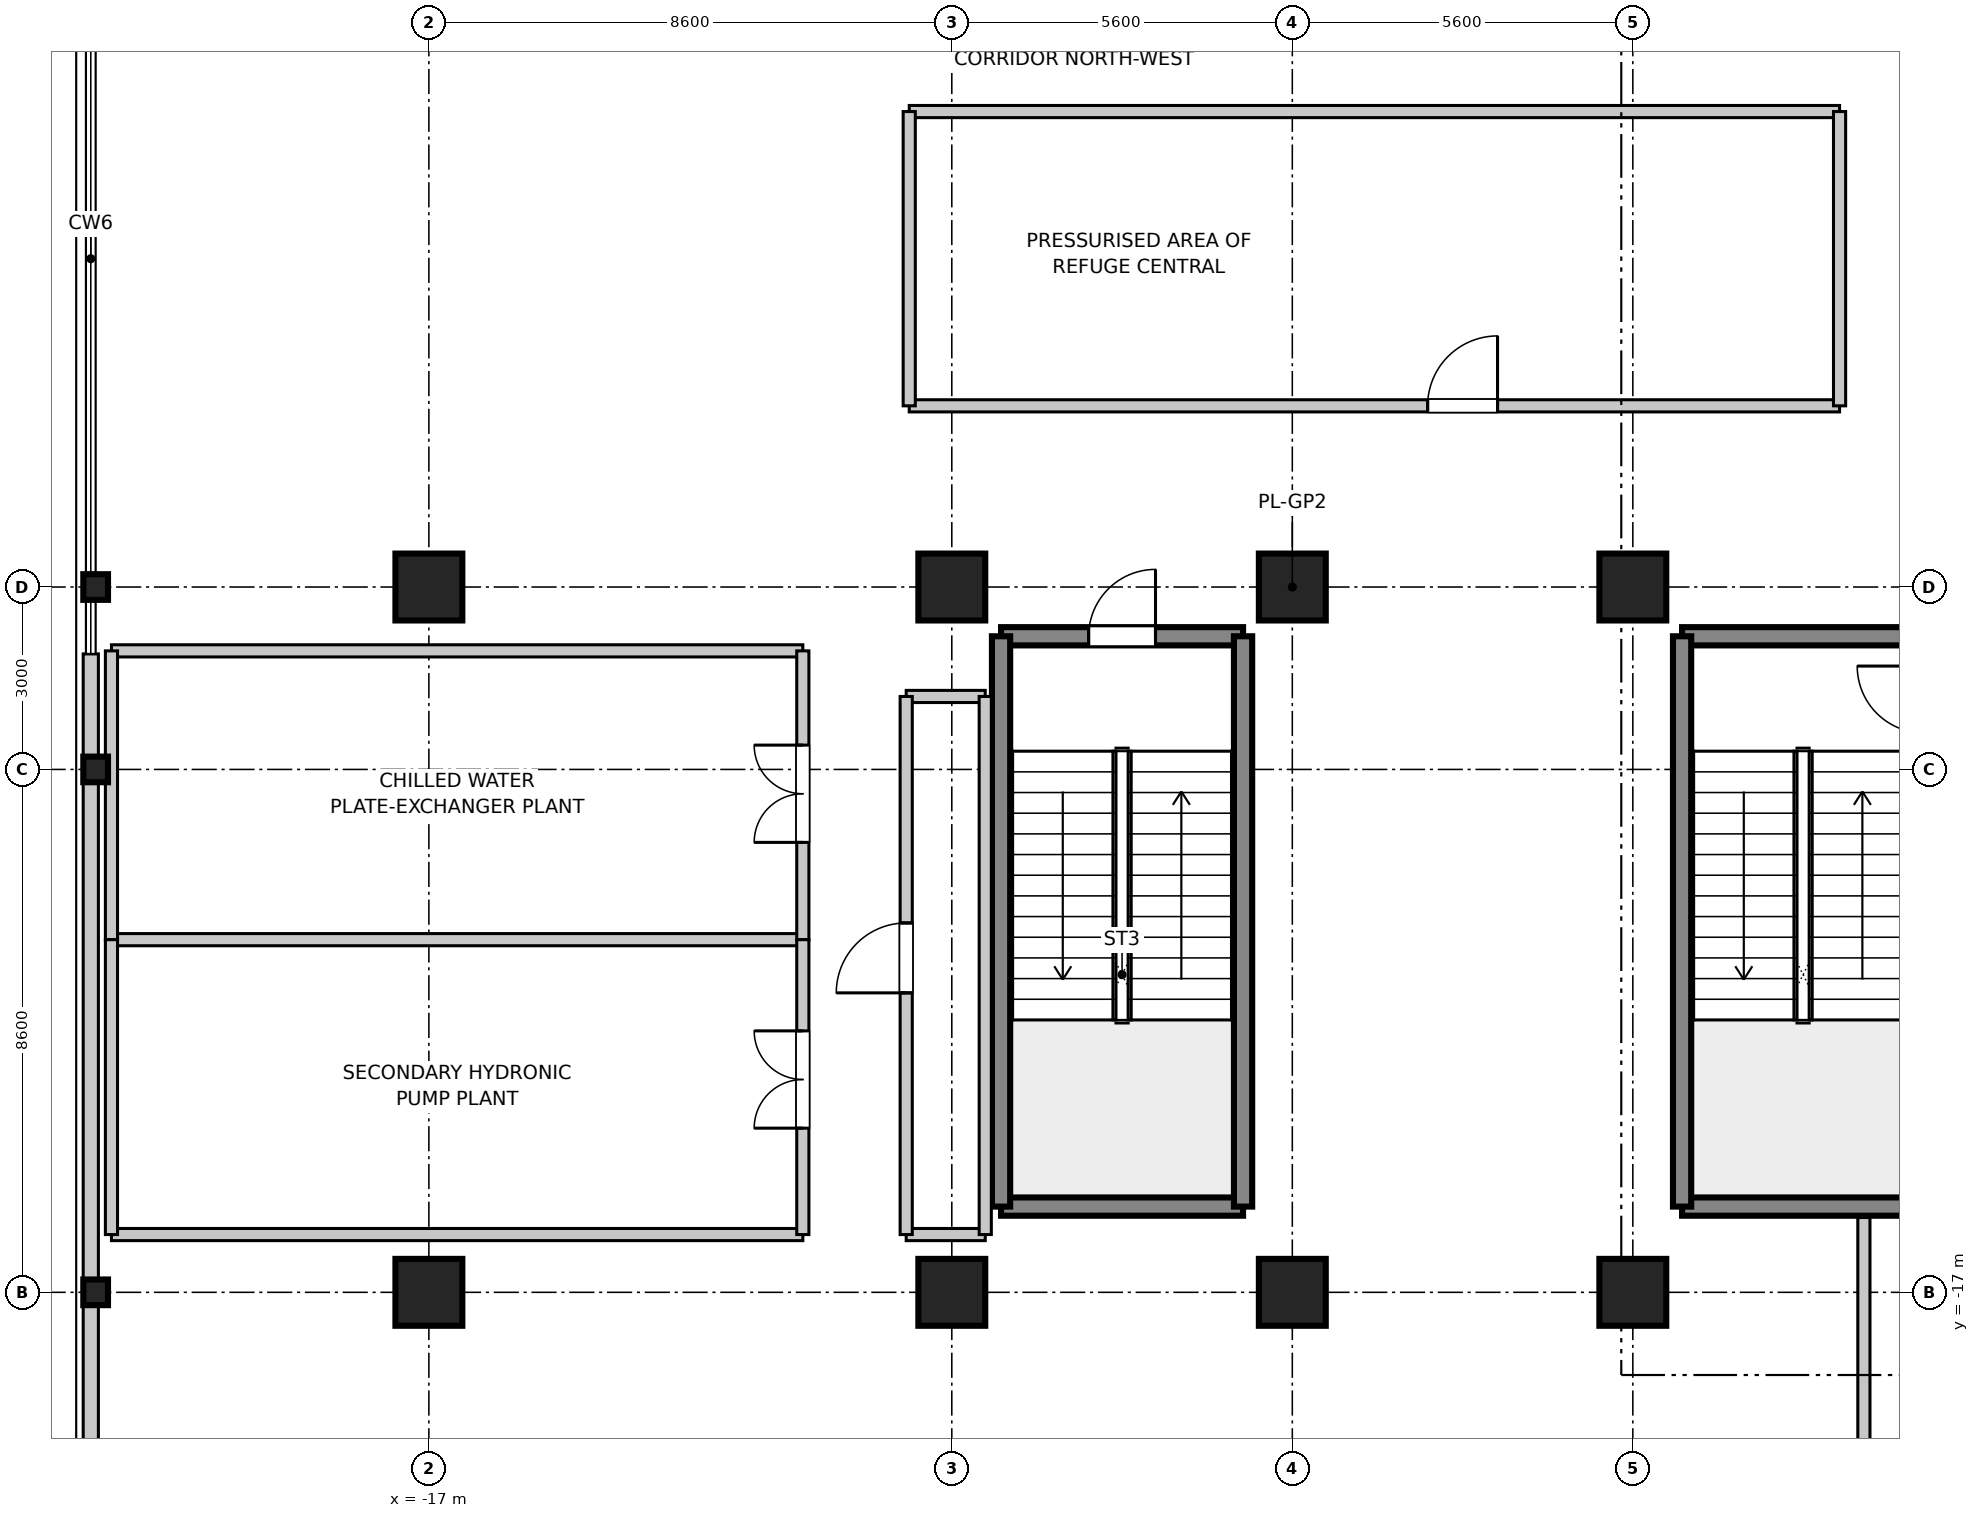
"""IFC4 building model, lengths in metres.
Left out: names, types, materials, properties, quantities, classifications, styles, units other than length and angle.
Written with IfcOpenShell. Run it as: python <this file> out.ifc"""

import sys

from ifc_helpers import new_model, si_unit, direction, frame, frame_2d, origin, origin_2d, place, context, subcontext, project, spatial, rectangle, i_section, extrude, source, transform, mapped, element, fill, save


model = new_model("IFC4")
c1 = context("Model", 3, precision=1e-05, world=origin(), true_north=direction((0.0, 1.0)))
c2 = subcontext(c1, "Body", "Model", "MODEL_VIEW")
j1 = project(units=[si_unit("LENGTHUNIT", "METRE"), si_unit("PLANEANGLEUNIT", "RADIAN")], contexts=[c1])
p1 = place(None, origin())
s1 = spatial("IfcSite", under=j1, at=p1, CompositionType="ELEMENT")
p2 = place(p1, origin())
s2 = spatial("IfcBuilding", under=s1, at=p2, CompositionType="ELEMENT")
p3 = place(p2, frame((0.0, 0.0, 200.1)))
s3 = spatial("IfcBuildingStorey", under=s2, at=p3, CompositionType="ELEMENT", Elevation=200.1)
m1 = source(origin(), c2, "Body", "SweptSolid", [
    extrude(rectangle(XDim=1.1, YDim=1.1, at=origin_2d()), origin(), (0.0, 0.0, 1.0), 4.755),
])
for number, where, z_axis, x_axis in (
    (1, (-17.0, -17.0, 0.0), (0.0, 0.0, 1.0), (1.0, 0.0, 0.0)),
    (2, (-17.0, -5.4, 0.0), (0.0, 0.0, 1.0), (1.0, 0.0, 0.0)),
    (3, (-8.4, -17.0, 0.0), (0.0, 0.0, 1.0), (1.0, 0.0, 0.0)),
    (4, (-8.4, -5.4, 0.0), (0.0, 0.0, 1.0), (1.0, 0.0, 0.0)),
    (5, (-2.8, -17.0, 0.0), (0.0, 0.0, 1.0), (1.0, 0.0, 0.0)),
    (6, (-2.8, -5.4, 0.0), (0.0, 0.0, 1.0), (1.0, 0.0, 0.0)),
    (7, (2.8, -17.0, 0.0), (0.0, 0.0, 1.0), (1.0, 0.0, 0.0)),
    (8, (2.8, -5.4, 0.0), (0.0, 0.0, 1.0), (1.0, 0.0, 0.0)),
):
    element("IfcColumn", number, at=place(p3, frame(where, z_axis=z_axis, x_axis=x_axis)), inside=s3, PredefinedType="COLUMN", context=c2, shape_type="MappedRepresentation", body=[
        mapped(m1, transform((0.0, 0.0, 0.0), scale=1.0)),
    ])
m2 = source(origin(), c2, "Body", "SweptSolid", [
    extrude(i_section(OverallWidth=0.406, OverallDepth=0.422, WebThickness=0.019, FlangeThickness=0.03, at=origin_2d()), origin(), (0.0, 0.0, 1.0), 4.861),
])
for number, where, z_axis, x_axis in (
    (9, (-22.48, -17.0, 0.0), (-0.288, 0.0, 0.958), (0.0, -1.0, 0.0)),
    (10, (-22.48, -8.4, 0.0), (-0.288, 0.0, 0.958), (0.0, -1.0, 0.0)),
    (11, (-22.48, -5.4, 0.0), (-0.288, 0.0, 0.958), (0.0, -1.0, 0.0)),
):
    element("IfcColumn", number, at=place(p3, frame(where, z_axis=z_axis, x_axis=x_axis)), inside=s3, PredefinedType="COLUMN", context=c2, shape_type="MappedRepresentation", body=[
        mapped(m2, transform((0.0, 0.0, 0.0), scale=1.0)),
    ])
m3 = source(origin(), c2, "Body", "SweptSolid", [
    extrude(rectangle(XDim=3.98, YDim=0.3, at=frame_2d((1.99, 0.0))), origin(), (0.0, 0.0, 1.0), 4.51),
])
for number, where, z_axis, x_axis in (
    (12, (3.61, -15.59, 0.0), (0.0, 0.0, 1.0), (1.0, 0.0, 0.0)),
    (13, (3.61, -6.21, 0.0), (0.0, 0.0, 1.0), (1.0, 0.0, 0.0)),
):
    element("IfcWall", number, at=place(p3, frame(where, z_axis=z_axis, x_axis=x_axis)), inside=s3, PredefinedType="SHEAR", context=c2, shape_type="MappedRepresentation", body=[
        mapped(m3, transform((0.0, 0.0, 0.0), scale=1.0)),
    ])
m4 = source(origin(), c2, "Body", "SweptSolid", [
    extrude(rectangle(XDim=9.38, YDim=0.3, at=frame_2d((4.69, 0.0))), origin(), (0.0, 0.0, 1.0), 4.51),
])
p4 = place(p3, frame((3.61, -15.59, 0.0), z_axis=(0.0, 0.0, 1.0), x_axis=(0.0, 1.0, 0.0)))
e14 = element("IfcWall", 14, at=p4, inside=s3, PredefinedType="SHEAR", context=c2, shape_type="MappedRepresentation", body=[
    mapped(m4, transform((0.0, 0.0, 0.0), scale=1.0)),
])
p5 = place(p3, frame((-7.59, -15.59, 0.0), z_axis=(0.0, 0.0, 1.0), x_axis=(1.0, 0.0, 0.0)))
e15 = element("IfcWall", 15, at=p5, inside=s3, PredefinedType="SHEAR", context=c2, shape_type="MappedRepresentation", body=[
    mapped(m3, transform((0.0, 0.0, 0.0), scale=1.0)),
])
p6 = place(p3, frame((-7.59, -6.21, 0.0), z_axis=(0.0, 0.0, 1.0), x_axis=(1.0, 0.0, 0.0)))
e16 = element("IfcWall", 16, at=p6, inside=s3, PredefinedType="SHEAR", context=c2, shape_type="MappedRepresentation", body=[
    mapped(m3, transform((0.0, 0.0, 0.0), scale=1.0)),
])
p7 = place(p6, frame((1.44, 0.0, 0.0)))
e17 = element("IfcOpeningElement", 17, at=p7, cuts=e16, PredefinedType="OPENING", context=c2, shape_type="SweptSolid", body=[
    extrude(rectangle(XDim=1.1, YDim=2.15, at=frame_2d((0.55, 1.075))), frame((0.0, 0.16, 0.0), z_axis=(0.0, -1.0, 0.0), x_axis=(1.0, 0.0, 0.0)), (0.0, 0.0, 1.0), 0.32),
])
for number, where, z_axis, x_axis in (
    (18, (-7.59, -15.59, 0.0), (0.0, 0.0, 1.0), (0.0, 1.0, 0.0)),
    (19, (-3.61, -15.59, 0.0), (0.0, 0.0, 1.0), (0.0, 1.0, 0.0)),
):
    element("IfcWall", number, at=place(p3, frame(where, z_axis=z_axis, x_axis=x_axis)), inside=s3, PredefinedType="SHEAR", context=c2, shape_type="MappedRepresentation", body=[
        mapped(m4, transform((0.0, 0.0, 0.0), scale=1.0)),
    ])
m5 = source(origin(), c2, "Body", "SweptSolid", [
    extrude(rectangle(XDim=13.26, YDim=0.25, at=frame_2d((6.63, 0.0))), origin(), (0.0, 0.0, 1.0), 3.99),
])
p8 = place(p3, frame((-22.56, -19.76, 0.0), z_axis=(0.0, 0.0, 1.0), x_axis=(0.0, 1.0, 0.0)))
e20 = element("IfcWall", 20, at=p8, inside=s3, PredefinedType="STANDARD", context=c2, shape_type="MappedRepresentation", body=[
    mapped(m5, transform((0.0, 0.0, 0.0), scale=1.0)),
])
m6 = source(origin(), c2, "Body", "SweptSolid", [
    extrude(rectangle(XDim=4.03, YDim=0.2, at=frame_2d((2.015, 0.0))), origin(), (0.0, 0.0, 1.0), 3.4),
])
p9 = place(p3, frame((6.6, -19.8, 0.0), z_axis=(0.0, 0.0, 1.0), x_axis=(0.0, 1.0, 0.0)))
e21 = element("IfcWall", 21, at=p9, inside=s3, PredefinedType="PARTITIONING", context=c2, shape_type="MappedRepresentation", body=[
    mapped(m6, transform((0.0, 0.0, 0.0), scale=1.0)),
])
m7 = source(origin(), c2, "Body", "SweptSolid", [
    extrude(rectangle(XDim=15.3, YDim=0.2, at=frame_2d((7.65, 0.0))), origin(), (0.0, 0.0, 1.0), 3.4),
])
p10 = place(p3, frame((-9.1, -2.42, 0.0), z_axis=(0.0, 0.0, 1.0), x_axis=(1.0, 0.0, 0.0)))
e22 = element("IfcWall", 22, at=p10, inside=s3, PredefinedType="PARTITIONING", context=c2, shape_type="MappedRepresentation", body=[
    mapped(m7, transform((0.0, 0.0, 0.0), scale=1.0)),
])
p11 = place(p10, frame((8.525, 0.0, 0.0)))
e23 = element("IfcOpeningElement", 23, at=p11, cuts=e22, PredefinedType="OPENING", context=c2, shape_type="SweptSolid", body=[
    extrude(rectangle(XDim=1.15, YDim=2.15, at=frame_2d((0.575, 1.075))), frame((0.0, 0.11, 0.0), z_axis=(0.0, -1.0, 0.0), x_axis=(1.0, 0.0, 0.0)), (0.0, 0.0, 1.0), 0.22),
])
p12 = place(p3, frame((-9.1, 2.42, 0.0), z_axis=(0.0, 0.0, 1.0), x_axis=(1.0, 0.0, 0.0)))
e24 = element("IfcWall", 24, at=p12, inside=s3, PredefinedType="PARTITIONING", context=c2, shape_type="MappedRepresentation", body=[
    mapped(m7, transform((0.0, 0.0, 0.0), scale=1.0)),
])
m8 = source(origin(), c2, "Body", "SweptSolid", [
    extrude(rectangle(XDim=4.84, YDim=0.2, at=frame_2d((2.42, 0.0))), origin(), (0.0, 0.0, 1.0), 3.4),
])
for number, where, z_axis, x_axis in (
    (25, (-9.1, -2.42, 0.0), (0.0, 0.0, 1.0), (0.0, 1.0, 0.0)),
    (26, (6.2, -2.42, 0.0), (0.0, 0.0, 1.0), (0.0, 1.0, 0.0)),
):
    element("IfcWall", number, at=place(p3, frame(where, z_axis=z_axis, x_axis=x_axis)), inside=s3, PredefinedType="PARTITIONING", context=c2, shape_type="MappedRepresentation", body=[
        mapped(m8, transform((0.0, 0.0, 0.0), scale=1.0)),
    ])
m9 = source(origin(), c2, "Body", "SweptSolid", [
    extrude(rectangle(XDim=1.3, YDim=0.2, at=frame_2d((0.65, 0.0))), origin(), (0.0, 0.0, 1.0), 3.4),
])
for number, where, z_axis, x_axis in (
    (27, (-9.15, -16.05, 0.0), (0.0, 0.0, 1.0), (1.0, 0.0, 0.0)),
    (28, (-9.15, -7.2, 0.0), (0.0, 0.0, 1.0), (1.0, 0.0, 0.0)),
):
    element("IfcWall", number, at=place(p3, frame(where, z_axis=z_axis, x_axis=x_axis)), inside=s3, PredefinedType="PARTITIONING", context=c2, shape_type="MappedRepresentation", body=[
        mapped(m9, transform((0.0, 0.0, 0.0), scale=1.0)),
    ])
m10 = source(origin(), c2, "Body", "SweptSolid", [
    extrude(rectangle(XDim=8.85, YDim=0.2, at=frame_2d((4.425, 0.0))), origin(), (0.0, 0.0, 1.0), 3.4),
])
p13 = place(p3, frame((-9.15, -16.05, 0.0), z_axis=(0.0, 0.0, 1.0), x_axis=(0.0, 1.0, 0.0)))
e29 = element("IfcWall", 29, at=p13, inside=s3, PredefinedType="PARTITIONING", context=c2, shape_type="MappedRepresentation", body=[
    mapped(m10, transform((0.0, 0.0, 0.0), scale=1.0)),
])
p14 = place(p13, frame((3.975, 0.0, 0.0)))
e30 = element("IfcOpeningElement", 30, at=p14, cuts=e29, PredefinedType="OPENING", context=c2, shape_type="SweptSolid", body=[
    extrude(rectangle(XDim=1.15, YDim=2.15, at=frame_2d((0.575, 1.075))), frame((0.0, 0.11, 0.0), z_axis=(0.0, -1.0, 0.0), x_axis=(1.0, 0.0, 0.0)), (0.0, 0.0, 1.0), 0.22),
])
p15 = place(p3, frame((-7.85, -16.05, 0.0), z_axis=(0.0, 0.0, 1.0), x_axis=(0.0, 1.0, 0.0)))
e31 = element("IfcWall", 31, at=p15, inside=s3, PredefinedType="PARTITIONING", context=c2, shape_type="MappedRepresentation", body=[
    mapped(m10, transform((0.0, 0.0, 0.0), scale=1.0)),
])
m11 = source(origin(), c2, "Body", "SweptSolid", [
    extrude(rectangle(XDim=11.37, YDim=0.2, at=frame_2d((5.685, 0.0))), origin(), (0.0, 0.0, 1.0), 3.4),
])
for number, where, z_axis, x_axis in (
    (32, (-22.22, -11.2, 0.0), (0.0, 0.0, 1.0), (1.0, 0.0, 0.0)),
    (33, (-22.22, -6.45, 0.0), (0.0, 0.0, 1.0), (1.0, 0.0, 0.0)),
):
    element("IfcWall", number, at=place(p3, frame(where, z_axis=z_axis, x_axis=x_axis)), inside=s3, PredefinedType="PARTITIONING", context=c2, shape_type="MappedRepresentation", body=[
        mapped(m11, transform((0.0, 0.0, 0.0), scale=1.0)),
    ])
m12 = source(origin(), c2, "Body", "SweptSolid", [
    extrude(rectangle(XDim=4.75, YDim=0.2, at=frame_2d((2.375, 0.0))), origin(), (0.0, 0.0, 1.0), 3.4),
])
p16 = place(p3, frame((-22.22, -11.2, 0.0), z_axis=(0.0, 0.0, 1.0), x_axis=(0.0, 1.0, 0.0)))
e34 = element("IfcWall", 34, at=p16, inside=s3, PredefinedType="PARTITIONING", context=c2, shape_type="MappedRepresentation", body=[
    mapped(m12, transform((0.0, 0.0, 0.0), scale=1.0)),
])
p17 = place(p3, frame((-10.85, -11.2, 0.0), z_axis=(0.0, 0.0, 1.0), x_axis=(0.0, 1.0, 0.0)))
e35 = element("IfcWall", 35, at=p17, inside=s3, PredefinedType="PARTITIONING", context=c2, shape_type="MappedRepresentation", body=[
    mapped(m12, transform((0.0, 0.0, 0.0), scale=1.0)),
])
p18 = place(p17, frame((1.6, 0.0, 0.0)))
e36 = element("IfcOpeningElement", 36, at=p18, cuts=e35, PredefinedType="OPENING", context=c2, shape_type="SweptSolid", body=[
    extrude(rectangle(XDim=1.6, YDim=2.15, at=frame_2d((0.8, 1.075))), frame((0.0, 0.11, 0.0), z_axis=(0.0, -1.0, 0.0), x_axis=(1.0, 0.0, 0.0)), (0.0, 0.0, 1.0), 0.22),
])
p19 = place(p3, frame((-22.22, -16.05, 0.0), z_axis=(0.0, 0.0, 1.0), x_axis=(1.0, 0.0, 0.0)))
e37 = element("IfcWall", 37, at=p19, inside=s3, PredefinedType="PARTITIONING", context=c2, shape_type="MappedRepresentation", body=[
    mapped(m11, transform((0.0, 0.0, 0.0), scale=1.0)),
])
m13 = source(origin(), c2, "Body", "SweptSolid", [
    extrude(rectangle(XDim=4.85, YDim=0.2, at=frame_2d((2.425, 0.0))), origin(), (0.0, 0.0, 1.0), 3.4),
])
p20 = place(p3, frame((-22.22, -16.05, 0.0), z_axis=(0.0, 0.0, 1.0), x_axis=(0.0, 1.0, 0.0)))
e38 = element("IfcWall", 38, at=p20, inside=s3, PredefinedType="PARTITIONING", context=c2, shape_type="MappedRepresentation", body=[
    mapped(m13, transform((0.0, 0.0, 0.0), scale=1.0)),
])
p21 = place(p3, frame((-10.85, -16.05, 0.0), z_axis=(0.0, 0.0, 1.0), x_axis=(0.0, 1.0, 0.0)))
e39 = element("IfcWall", 39, at=p21, inside=s3, PredefinedType="PARTITIONING", context=c2, shape_type="MappedRepresentation", body=[
    mapped(m13, transform((0.0, 0.0, 0.0), scale=1.0)),
])
p22 = place(p21, frame((1.75, 0.0, 0.0)))
e40 = element("IfcOpeningElement", 40, at=p22, cuts=e39, PredefinedType="OPENING", context=c2, shape_type="SweptSolid", body=[
    extrude(rectangle(XDim=1.6, YDim=2.15, at=frame_2d((0.8, 1.075))), frame((0.0, 0.11, 0.0), z_axis=(0.0, -1.0, 0.0), x_axis=(1.0, 0.0, 0.0)), (0.0, 0.0, 1.0), 0.22),
])
m14 = source(origin(), c2, "Body", "SweptSolid", [
    extrude(rectangle(XDim=1.1, YDim=2.15, at=frame_2d((0.55, 1.075))), frame((0.0, 0.025, 0.0), z_axis=(0.0, -1.0, 0.0), x_axis=(1.0, 0.0, 0.0)), (0.0, 0.0, 1.0), 0.05),
])
p23 = place(p7, frame((1.1, 0.0, 0.0), z_axis=(0.0, 0.0, 1.0), x_axis=(-1.0, 0.0, 0.0)))
e41 = element("IfcDoor", 41, at=p23, inside=s3, OperationType="SINGLE_SWING_RIGHT", PredefinedType="DOOR", context=c2, shape_type="MappedRepresentation", body=[
    mapped(m14, transform((0.0, 0.0, 0.0), scale=1.0)),
])
fill(e17, e41)
m15 = source(origin(), c2, "Body", "SweptSolid", [
    extrude(rectangle(XDim=1.15, YDim=2.15, at=frame_2d((0.575, 1.075))), frame((0.0, 0.025, 0.0), z_axis=(0.0, -1.0, 0.0), x_axis=(1.0, 0.0, 0.0)), (0.0, 0.0, 1.0), 0.05),
])
p24 = place(p11, origin())
e42 = element("IfcDoor", 42, at=p24, inside=s3, OperationType="SINGLE_SWING_RIGHT", PredefinedType="DOOR", context=c2, shape_type="MappedRepresentation", body=[
    mapped(m15, transform((0.0, 0.0, 0.0), scale=1.0)),
])
fill(e23, e42)
p25 = place(p14, frame((1.15, 0.0, 0.0), z_axis=(0.0, 0.0, 1.0), x_axis=(-1.0, 0.0, 0.0)))
e43 = element("IfcDoor", 43, at=p25, inside=s3, OperationType="SINGLE_SWING_LEFT", PredefinedType="DOOR", context=c2, shape_type="MappedRepresentation", body=[
    mapped(m15, transform((0.0, 0.0, 0.0), scale=1.0)),
])
fill(e30, e43)
m16 = source(origin(), c2, "Body", "SweptSolid", [
    extrude(rectangle(XDim=1.6, YDim=2.15, at=frame_2d((0.8, 1.075))), frame((0.0, 0.025, 0.0), z_axis=(0.0, -1.0, 0.0), x_axis=(1.0, 0.0, 0.0)), (0.0, 0.0, 1.0), 0.05),
])
p26 = place(p18, origin())
e44 = element("IfcDoor", 44, at=p26, inside=s3, OperationType="DOUBLE_DOOR_SINGLE_SWING", PredefinedType="DOOR", context=c2, shape_type="MappedRepresentation", body=[
    mapped(m16, transform((0.0, 0.0, 0.0), scale=1.0)),
])
fill(e36, e44)
p27 = place(p22, origin())
e45 = element("IfcDoor", 45, at=p27, inside=s3, OperationType="DOUBLE_DOOR_SINGLE_SWING", PredefinedType="DOOR", context=c2, shape_type="MappedRepresentation", body=[
    mapped(m16, transform((0.0, 0.0, 0.0), scale=1.0)),
])
fill(e40, e45)
save(model, sys.argv[1])
